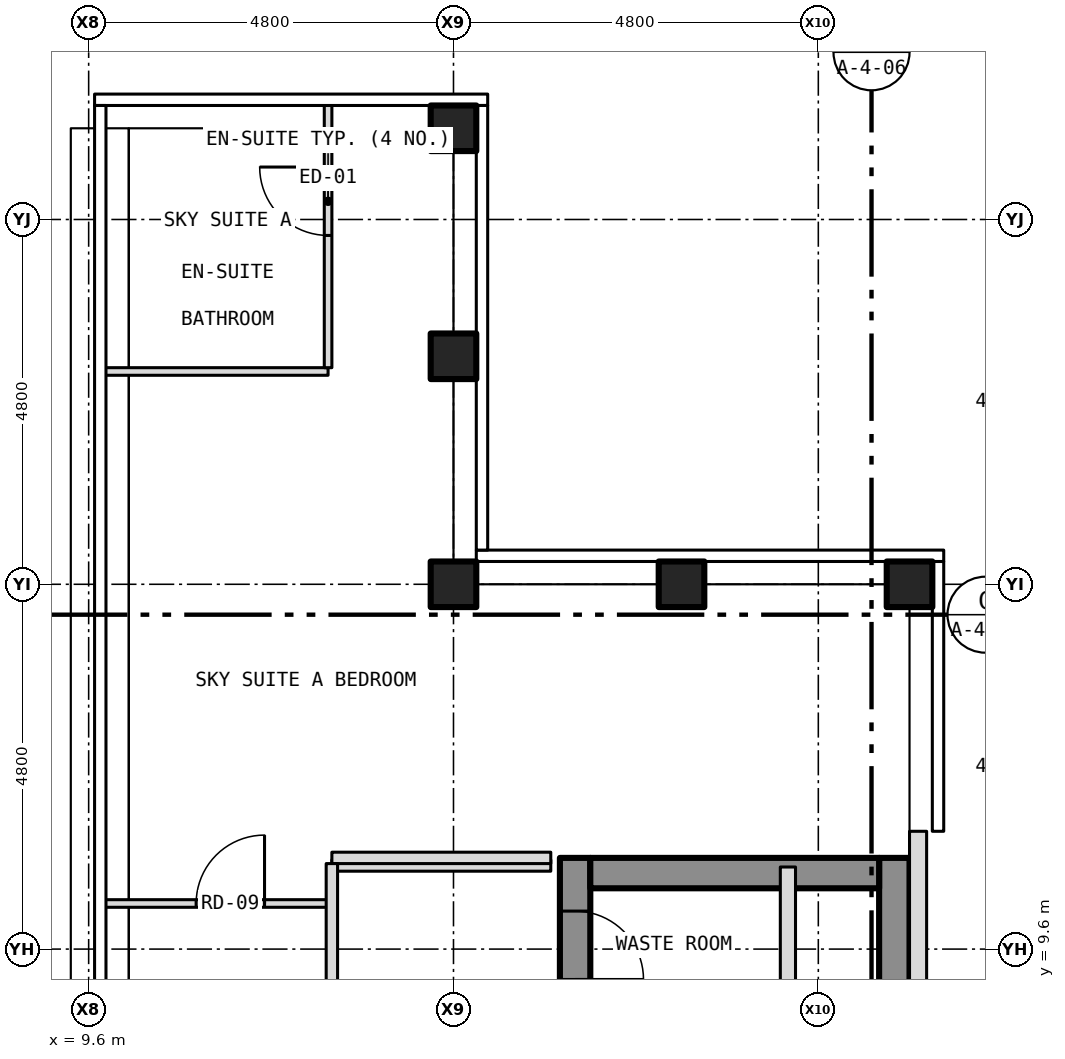
"""IFC4 building model, lengths in metres.
Left out: names, types, materials, properties, quantities, classifications, styles, units other than length and angle.
Written with IfcOpenShell. Run it as: python <this file> out.ifc"""

import sys

from ifc_helpers import new_model, si_unit, direction, frame, frame_2d, origin, origin_2d, place, context, subcontext, project, spatial, rectangle, hollow_rectangle, extrude, element, fill, save


model = new_model("IFC4")
c1 = context("Model", 3, precision=1e-05, world=origin(), true_north=direction((0.0, 1.0)))
c2 = subcontext(c1, "Body", "Model", "MODEL_VIEW")
j1 = project(units=[si_unit("LENGTHUNIT", "METRE"), si_unit("PLANEANGLEUNIT", "RADIAN")], contexts=[c1])
p1 = place(None, origin())
s1 = spatial("IfcSite", under=j1, at=p1, CompositionType="ELEMENT")
p2 = place(p1, origin())
s2 = spatial("IfcBuilding", under=s1, at=p2, CompositionType="ELEMENT")
p3 = place(p2, frame((0.0, 0.0, 279.5)))
s3 = spatial("IfcBuildingStorey", under=s2, at=p3, CompositionType="ELEMENT", Elevation=279.5)
for number, where, z_axis, x_axis in (
    (1, (14.4, 20.4, -0.15), (0.0, 0.0, 1.0), (1.0, 0.0, 0.0)),
    (2, (20.4, 14.4, -0.15), (0.0, 0.0, 1.0), (1.0, 0.0, 0.0)),
    (3, (14.4, 14.4, -0.15), (0.0, 0.0, 1.0), (1.0, 0.0, 0.0)),
    (4, (14.4, 17.4, -0.15), (0.0, 0.0, 1.0), (1.0, 0.0, 0.0)),
    (5, (17.4, 14.4, -0.15), (0.0, 0.0, 1.0), (1.0, 0.0, 0.0)),
):
    element("IfcColumn", number, at=place(p3, frame(where, z_axis=z_axis, x_axis=x_axis)), inside=s3, PredefinedType="COLUMN", context=c2, shape_type="SweptSolid", body=[
        extrude(hollow_rectangle(XDim=0.6, YDim=0.6, WallThickness=0.03, at=origin_2d()), origin(), (0.0, 0.0, 1.0), 3.5),
    ])
p4 = place(p3, frame((16.0, -10.8, 0.0), z_axis=(0.0, 0.0, 1.0), x_axis=(0.0, 1.0, 0.0)))
e6 = element("IfcWall", 6, at=p4, inside=s3, PredefinedType="SHEAR", context=c2, shape_type="SweptSolid", body=[
    extrude(rectangle(XDim=21.6, YDim=0.4, at=frame_2d((10.8, 0.0))), origin(), (0.0, 0.0, 1.0), 3.25),
])
p5 = place(p4, frame((9.4, 0.0, 0.0)))
e7 = element("IfcOpeningElement", 7, at=p5, cuts=e6, PredefinedType="OPENING", context=c2, shape_type="SweptSolid", body=[
    extrude(rectangle(XDim=1.1, YDim=2.1, at=frame_2d((0.55, 1.05))), frame((0.0, 0.212, 0.0), z_axis=(0.0, -1.0, 0.0), x_axis=(1.0, 0.0, 0.0)), (0.0, 0.0, 1.0), 0.424),
])
p6 = place(p4, frame((11.5, 0.0, 0.0)))
e8 = element("IfcOpeningElement", 8, at=p6, cuts=e6, PredefinedType="OPENING", context=c2, shape_type="SweptSolid", body=[
    extrude(rectangle(XDim=1.1, YDim=2.1, at=frame_2d((0.55, 1.05))), frame((0.0, 0.212, 0.0), z_axis=(0.0, -1.0, 0.0), x_axis=(1.0, 0.0, 0.0)), (0.0, 0.0, 1.0), 0.424),
])
p7 = place(p4, frame((13.6, 0.0, 0.0)))
e9 = element("IfcOpeningElement", 9, at=p7, cuts=e6, PredefinedType="OPENING", context=c2, shape_type="SweptSolid", body=[
    extrude(rectangle(XDim=1.1, YDim=2.1, at=frame_2d((0.55, 1.05))), frame((0.0, 0.212, 0.0), z_axis=(0.0, -1.0, 0.0), x_axis=(1.0, 0.0, 0.0)), (0.0, 0.0, 1.0), 0.424),
])
p8 = place(p4, frame((15.7, 0.0, 0.0)))
e10 = element("IfcOpeningElement", 10, at=p8, cuts=e6, PredefinedType="OPENING", context=c2, shape_type="SweptSolid", body=[
    extrude(rectangle(XDim=1.1, YDim=2.1, at=frame_2d((0.55, 1.05))), frame((0.0, 0.212, 0.0), z_axis=(0.0, -1.0, 0.0), x_axis=(1.0, 0.0, 0.0)), (0.0, 0.0, 1.0), 0.424),
])
p9 = place(p4, frame((17.8, 0.0, 0.0)))
e11 = element("IfcOpeningElement", 11, at=p9, cuts=e6, PredefinedType="OPENING", context=c2, shape_type="SweptSolid", body=[
    extrude(rectangle(XDim=1.1, YDim=2.1, at=frame_2d((0.55, 1.05))), frame((0.0, 0.212, 0.0), z_axis=(0.0, -1.0, 0.0), x_axis=(1.0, 0.0, 0.0)), (0.0, 0.0, 1.0), 0.424),
])
p10 = place(p4, frame((5.642, 0.0, 0.0)))
e12 = element("IfcOpeningElement", 12, at=p10, cuts=e6, PredefinedType="OPENING", context=c2, shape_type="SweptSolid", body=[
    extrude(rectangle(XDim=1.1, YDim=2.1, at=frame_2d((0.55, 1.05))), frame((0.0, 0.212, 0.0), z_axis=(0.0, -1.0, 0.0), x_axis=(1.0, 0.0, 0.0)), (0.0, 0.0, 1.0), 0.424),
])
p11 = place(p4, frame((7.5, 0.0, 0.0)))
e13 = element("IfcOpeningElement", 13, at=p11, cuts=e6, PredefinedType="OPENING", context=c2, shape_type="SweptSolid", body=[
    extrude(rectangle(XDim=1.1, YDim=2.1, at=frame_2d((0.55, 1.05))), frame((0.0, 0.212, 0.0), z_axis=(0.0, -1.0, 0.0), x_axis=(1.0, 0.0, 0.0)), (0.0, 0.0, 1.0), 0.424),
])
p12 = place(p4, frame((20.0, 0.0, 0.0)))
e14 = element("IfcOpeningElement", 14, at=p12, cuts=e6, PredefinedType="OPENING", context=c2, shape_type="SweptSolid", body=[
    extrude(rectangle(XDim=0.9, YDim=2.1, at=frame_2d((0.45, 1.05))), frame((0.0, 0.212, 0.0), z_axis=(0.0, -1.0, 0.0), x_axis=(1.0, 0.0, 0.0)), (0.0, 0.0, 1.0), 0.424),
])
p13 = place(p3, frame((20.2, -10.8, 0.0), z_axis=(0.0, 0.0, 1.0), x_axis=(0.0, 1.0, 0.0)))
e15 = element("IfcWall", 15, at=p13, inside=s3, PredefinedType="SHEAR", context=c2, shape_type="SweptSolid", body=[
    extrude(rectangle(XDim=21.6, YDim=0.4, at=frame_2d((10.8, 0.0))), origin(), (0.0, 0.0, 1.0), 3.25),
])
p14 = place(p3, frame((16.2, 10.6, 0.0), z_axis=(0.0, 0.0, 1.0), x_axis=(1.0, 0.0, 0.0)))
e16 = element("IfcWall", 16, at=p14, inside=s3, PredefinedType="SHEAR", context=c2, shape_type="SweptSolid", body=[
    extrude(rectangle(XDim=3.8, YDim=0.4, at=frame_2d((1.9, 0.0))), origin(), (0.0, 0.0, 1.0), 3.25),
])
p15 = place(p3, frame((20.512, -11.15, 0.0), z_axis=(0.0, 0.0, 1.0), x_axis=(0.0, 1.0, 0.0)))
e17 = element("IfcWall", 17, at=p15, inside=s3, PredefinedType="SOLIDWALL", context=c2, shape_type="SweptSolid", body=[
    extrude(rectangle(XDim=22.3, YDim=0.225, at=frame_2d((11.15, 0.0))), origin(), (0.0, 0.0, 1.0), 3.5),
])
p16 = place(p15, frame((3.3, 0.0, 1.0)))
e18 = element("IfcOpeningElement", 18, at=p16, cuts=e17, PredefinedType="OPENING", context=c2, shape_type="SweptSolid", body=[
    extrude(rectangle(XDim=0.6, YDim=1.5, at=frame_2d((0.3, 0.75))), frame((0.0, 0.125, 0.0), z_axis=(0.0, -1.0, 0.0), x_axis=(1.0, 0.0, 0.0)), (0.0, 0.0, 1.0), 0.249),
])
p17 = place(p3, frame((9.798, 10.2, 0.0), z_axis=(0.0, 0.0, 1.0), x_axis=(1.0, 0.0, 0.0)))
e19 = element("IfcWall", 19, at=p17, inside=s3, PredefinedType="PARTITIONING", context=c2, shape_type="SweptSolid", body=[
    extrude(rectangle(XDim=3.002, YDim=0.1, at=frame_2d((1.501, 0.0))), origin(), (0.0, 0.0, 1.0), 3.35),
])
p18 = place(p17, frame((1.216, 0.0, 0.0)))
e20 = element("IfcOpeningElement", 20, at=p18, cuts=e19, PredefinedType="OPENING", context=c2, shape_type="SweptSolid", body=[
    extrude(rectangle(XDim=0.9, YDim=2.1, at=frame_2d((0.45, 1.05))), frame((0.0, 0.062, 0.0), z_axis=(0.0, -1.0, 0.0), x_axis=(1.0, 0.0, 0.0)), (0.0, 0.0, 1.0), 0.124),
])
for number, where, z_axis, x_axis in (
    (21, (12.8, 10.7, 0.0), (0.0, 0.0, 1.0), (1.0, 0.0, 0.0)),
    (22, (12.8, 10.8, 0.0), (0.0, 0.0, 1.0), (1.0, 0.0, 0.0)),
):
    element("IfcWall", number, at=place(p3, frame(where, z_axis=z_axis, x_axis=x_axis)), inside=s3, PredefinedType="PARTITIONING", context=c2, shape_type="SweptSolid", body=[
        extrude(rectangle(XDim=2.88, YDim=0.15, at=frame_2d((1.44, 0.0))), origin(), (0.0, 0.0, 1.0), 3.35),
    ])
p19 = place(p3, frame((9.798, 17.2, 0.0), z_axis=(0.0, 0.0, 1.0), x_axis=(1.0, 0.0, 0.0)))
e23 = element("IfcWall", 23, at=p19, inside=s3, PredefinedType="PARTITIONING", context=c2, shape_type="SweptSolid", body=[
    extrude(rectangle(XDim=2.952, YDim=0.1, at=frame_2d((1.476, 0.0))), origin(), (0.0, 0.0, 1.0), 3.35),
])
p20 = place(p3, frame((12.75, 17.25, 0.0), z_axis=(0.0, 0.0, 1.0), x_axis=(0.0, 1.0, 0.0)))
e24 = element("IfcWall", 24, at=p20, inside=s3, PredefinedType="PARTITIONING", context=c2, shape_type="SweptSolid", body=[
    extrude(rectangle(XDim=3.48, YDim=0.1, at=frame_2d((1.74, 0.0))), origin(), (0.0, 0.0, 1.0), 3.35),
])
p21 = place(p20, frame((1.74, 0.0, 0.0)))
e25 = element("IfcOpeningElement", 25, at=p21, cuts=e24, PredefinedType="OPENING", context=c2, shape_type="SweptSolid", body=[
    extrude(rectangle(XDim=0.9, YDim=2.1, at=frame_2d((0.45, 1.05))), frame((0.0, 0.062, 0.0), z_axis=(0.0, -1.0, 0.0), x_axis=(1.0, 0.0, 0.0)), (0.0, 0.0, 1.0), 0.124),
])
p22 = place(p3, frame((12.8, 2.4, 0.0), z_axis=(0.0, 0.0, 1.0), x_axis=(0.0, 1.0, 0.0)))
e26 = element("IfcWall", 26, at=p22, inside=s3, PredefinedType="PARTITIONING", context=c2, shape_type="SweptSolid", body=[
    extrude(rectangle(XDim=8.325, YDim=0.15, at=frame_2d((4.163, 0.0))), origin(), (0.0, 0.0, 1.0), 3.35),
])
p23 = place(p22, frame((1.105, 0.0, 0.0)))
e27 = element("IfcOpeningElement", 27, at=p23, cuts=e26, PredefinedType="OPENING", context=c2, shape_type="SweptSolid", body=[
    extrude(rectangle(XDim=0.9, YDim=2.1, at=frame_2d((0.45, 1.05))), frame((0.0, 0.087, 0.0), z_axis=(0.0, -1.0, 0.0), x_axis=(1.0, 0.0, 0.0)), (0.0, 0.0, 1.0), 0.174),
])
p24 = place(p3, frame((18.8, 4.5, 0.0), z_axis=(0.0, 0.0, 1.0), x_axis=(0.0, 1.0, 0.0)))
e28 = element("IfcWall", 28, at=p24, inside=s3, PredefinedType="PARTITIONING", context=c2, shape_type="SweptSolid", body=[
    extrude(rectangle(XDim=6.18, YDim=0.2, at=frame_2d((3.09, 0.0))), origin(), (0.0, 0.0, 1.0), 3.25),
])
p25 = place(p12, origin())
e29 = element("IfcDoor", 29, at=p25, inside=s3, OperationType="SINGLE_SWING_LEFT", PredefinedType="DOOR", context=c2, shape_type="SweptSolid", body=[
    extrude(rectangle(XDim=0.9, YDim=2.1, at=frame_2d((0.45, 1.05))), frame((0.0, 0.025, 0.0), z_axis=(0.0, -1.0, 0.0), x_axis=(1.0, 0.0, 0.0)), (0.0, 0.0, 1.0), 0.05),
])
fill(e14, e29)
p26 = place(p18, origin())
e30 = element("IfcDoor", 30, at=p26, inside=s3, OperationType="SINGLE_SWING_RIGHT", PredefinedType="DOOR", context=c2, shape_type="SweptSolid", body=[
    extrude(rectangle(XDim=0.9, YDim=2.1, at=frame_2d((0.45, 1.05))), frame((0.0, 0.025, 0.0), z_axis=(0.0, -1.0, 0.0), x_axis=(1.0, 0.0, 0.0)), (0.0, 0.0, 1.0), 0.05),
])
fill(e20, e30)
p27 = place(p21, origin())
e31 = element("IfcDoor", 31, at=p27, inside=s3, OperationType="SINGLE_SWING_RIGHT", PredefinedType="DOOR", context=c2, shape_type="SweptSolid", body=[
    extrude(rectangle(XDim=0.9, YDim=2.1, at=frame_2d((0.45, 1.05))), frame((0.0, 0.025, 0.0), z_axis=(0.0, -1.0, 0.0), x_axis=(1.0, 0.0, 0.0)), (0.0, 0.0, 1.0), 0.05),
])
fill(e25, e31)
save(model, sys.argv[1])
